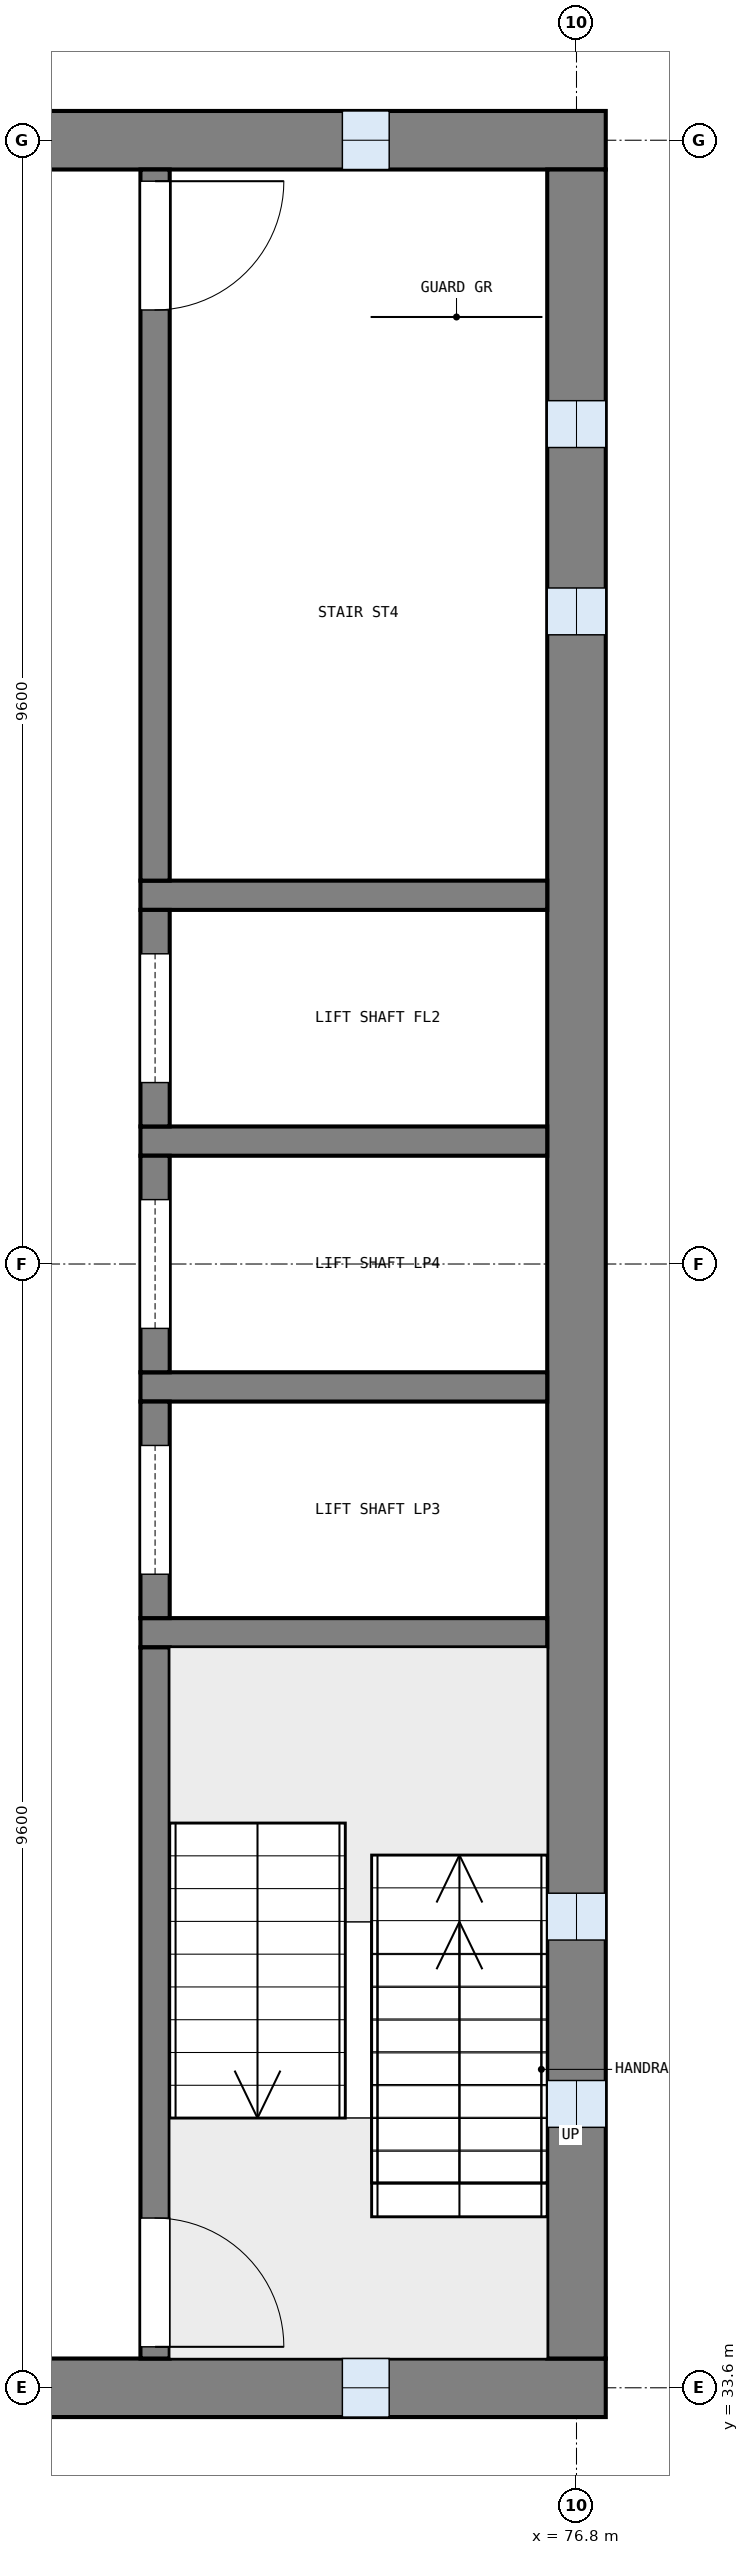
"""IFC4 building model, lengths in metres.
Left out: names, types, materials, properties, quantities, classifications, styles, units other than length and angle.
Written with IfcOpenShell. Run it as: python <this file> out.ifc"""

import sys

from ifc_helpers import new_model, si_unit, direction, frame, frame_2d, origin, place, context, subcontext, project, spatial, rectangle, extrude, element, fill, save


model = new_model("IFC4")
c1 = context("Model", 3, precision=1e-05, world=origin(), true_north=direction((0.0, 1.0)))
c2 = subcontext(c1, "Body", "Model", "MODEL_VIEW")
j1 = project(units=[si_unit("LENGTHUNIT", "METRE"), si_unit("PLANEANGLEUNIT", "RADIAN")], contexts=[c1])
p1 = place(None, origin())
s1 = spatial("IfcSite", under=j1, at=p1, CompositionType="ELEMENT")
p2 = place(p1, origin())
s2 = spatial("IfcBuilding", under=s1, at=p2, CompositionType="ELEMENT")
p3 = place(p2, frame((0.0, 0.0, 64.2)))
s3 = spatial("IfcBuildingStorey", under=s2, at=p3, CompositionType="ELEMENT", Elevation=64.2)
p4 = place(p3, frame((63.75, 52.8, 0.0), z_axis=(0.0, 0.0, 1.0), x_axis=(1.0, 0.0, 0.0)))
e1 = element("IfcWall", 1, at=p4, inside=s3, PredefinedType="SHEAR", context=c2, shape_type="SweptSolid", body=[
    extrude(rectangle(XDim=13.3, YDim=0.5, at=frame_2d((6.65, 0.0))), origin(), (0.0, 0.0, 1.0), 5.1),
])
p5 = place(p4, frame((11.05, 0.0, 1.0)))
e2 = element("IfcOpeningElement", 2, at=p5, cuts=e1, PredefinedType="OPENING", context=c2, shape_type="SweptSolid", body=[
    extrude(rectangle(XDim=0.4, YDim=2.0, at=frame_2d((0.2, 1.0))), frame((0.0, 0.26, 0.0), z_axis=(0.0, -1.0, 0.0), x_axis=(1.0, 0.0, 0.0)), (0.0, 0.0, 1.0), 0.52),
])
p6 = place(p3, frame((63.75, 33.6, 0.0), z_axis=(0.0, 0.0, 1.0), x_axis=(1.0, 0.0, 0.0)))
e3 = element("IfcWall", 3, at=p6, inside=s3, PredefinedType="SHEAR", context=c2, shape_type="SweptSolid", body=[
    extrude(rectangle(XDim=13.3, YDim=0.5, at=frame_2d((6.65, 0.0))), origin(), (0.0, 0.0, 1.0), 5.1),
])
p7 = place(p6, frame((11.05, 0.0, 1.0)))
e4 = element("IfcOpeningElement", 4, at=p7, cuts=e3, PredefinedType="OPENING", context=c2, shape_type="SweptSolid", body=[
    extrude(rectangle(XDim=0.4, YDim=2.0, at=frame_2d((0.2, 1.0))), frame((0.0, 0.26, 0.0), z_axis=(0.0, -1.0, 0.0), x_axis=(1.0, 0.0, 0.0)), (0.0, 0.0, 1.0), 0.52),
])
p8 = place(p3, frame((76.8, 33.85, 0.0), z_axis=(0.0, 0.0, 1.0), x_axis=(0.0, 1.0, 0.0)))
e5 = element("IfcWall", 5, at=p8, inside=s3, PredefinedType="SHEAR", context=c2, shape_type="SweptSolid", body=[
    extrude(rectangle(XDim=18.7, YDim=0.5, at=frame_2d((9.35, 0.0))), origin(), (0.0, 0.0, 1.0), 5.1),
])
p9 = place(p8, frame((1.975, 0.0, 1.0)))
e6 = element("IfcOpeningElement", 6, at=p9, cuts=e5, PredefinedType="OPENING", context=c2, shape_type="SweptSolid", body=[
    extrude(rectangle(XDim=0.4, YDim=2.0, at=frame_2d((0.2, 1.0))), frame((0.0, 0.26, 0.0), z_axis=(0.0, -1.0, 0.0), x_axis=(1.0, 0.0, 0.0)), (0.0, 0.0, 1.0), 0.52),
])
p10 = place(p8, frame((3.575, 0.0, 1.0)))
e7 = element("IfcOpeningElement", 7, at=p10, cuts=e5, PredefinedType="OPENING", context=c2, shape_type="SweptSolid", body=[
    extrude(rectangle(XDim=0.4, YDim=2.0, at=frame_2d((0.2, 1.0))), frame((0.0, 0.26, 0.0), z_axis=(0.0, -1.0, 0.0), x_axis=(1.0, 0.0, 0.0)), (0.0, 0.0, 1.0), 0.52),
])
p11 = place(p8, frame((14.725, 0.0, 1.0)))
e8 = element("IfcOpeningElement", 8, at=p11, cuts=e5, PredefinedType="OPENING", context=c2, shape_type="SweptSolid", body=[
    extrude(rectangle(XDim=0.4, YDim=2.0, at=frame_2d((0.2, 1.0))), frame((0.0, 0.26, 0.0), z_axis=(0.0, -1.0, 0.0), x_axis=(1.0, 0.0, 0.0)), (0.0, 0.0, 1.0), 0.52),
])
p12 = place(p8, frame((16.325, 0.0, 1.0)))
e9 = element("IfcOpeningElement", 9, at=p12, cuts=e5, PredefinedType="OPENING", context=c2, shape_type="SweptSolid", body=[
    extrude(rectangle(XDim=0.4, YDim=2.0, at=frame_2d((0.2, 1.0))), frame((0.0, 0.26, 0.0), z_axis=(0.0, -1.0, 0.0), x_axis=(1.0, 0.0, 0.0)), (0.0, 0.0, 1.0), 0.52),
])
for number, where, z_axis, x_axis in (
    (10, (76.55, 40.05, 0.0), (0.0, 0.0, 1.0), (-1.0, 0.0, 0.0)),
    (11, (76.55, 42.15, 0.0), (0.0, 0.0, 1.0), (-1.0, 0.0, 0.0)),
    (12, (76.55, 44.25, 0.0), (0.0, 0.0, 1.0), (-1.0, 0.0, 0.0)),
    (13, (76.55, 46.35, 0.0), (0.0, 0.0, 1.0), (-1.0, 0.0, 0.0)),
):
    element("IfcWall", number, at=place(p3, frame(where, z_axis=z_axis, x_axis=x_axis)), inside=s3, PredefinedType="SOLIDWALL", context=c2, shape_type="SweptSolid", body=[
        extrude(rectangle(XDim=3.475, YDim=0.25, at=frame_2d((1.738, 0.0))), origin(), (0.0, 0.0, 1.0), 5.1),
    ])
p13 = place(p3, frame((73.2, 33.85, 0.0), z_axis=(0.0, 0.0, 1.0), x_axis=(0.0, 1.0, 0.0)))
e14 = element("IfcWall", 14, at=p13, inside=s3, PredefinedType="SOLIDWALL", context=c2, shape_type="SweptSolid", body=[
    extrude(rectangle(XDim=6.075, YDim=0.25, at=frame_2d((3.038, 0.0))), origin(), (0.0, 0.0, 1.0), 5.1),
])
p14 = place(p13, frame((0.1, 0.0, 0.0)))
e15 = element("IfcOpeningElement", 15, at=p14, cuts=e14, PredefinedType="OPENING", context=c2, shape_type="SweptSolid", body=[
    extrude(rectangle(XDim=1.1, YDim=2.1, at=frame_2d((0.55, 1.05))), frame((0.0, 0.135, 0.0), z_axis=(0.0, -1.0, 0.0), x_axis=(1.0, 0.0, 0.0)), (0.0, 0.0, 1.0), 0.27),
])
p15 = place(p3, frame((73.2, 40.175, 0.0), z_axis=(0.0, 0.0, 1.0), x_axis=(0.0, 1.0, 0.0)))
e16 = element("IfcWall", 16, at=p15, inside=s3, PredefinedType="SOLIDWALL", context=c2, shape_type="SweptSolid", body=[
    extrude(rectangle(XDim=1.85, YDim=0.25, at=frame_2d((0.925, 0.0))), origin(), (0.0, 0.0, 1.0), 5.1),
])
p16 = place(p15, frame((0.375, 0.0, 0.0)))
e17 = element("IfcOpeningElement", 17, at=p16, cuts=e16, PredefinedType="OPENING", context=c2, shape_type="SweptSolid", body=[
    extrude(rectangle(XDim=1.1, YDim=2.1, at=frame_2d((0.55, 1.05))), frame((0.0, 0.135, 0.0), z_axis=(0.0, -1.0, 0.0), x_axis=(1.0, 0.0, 0.0)), (0.0, 0.0, 1.0), 0.27),
])
p17 = place(p3, frame((73.2, 42.275, 0.0), z_axis=(0.0, 0.0, 1.0), x_axis=(0.0, 1.0, 0.0)))
e18 = element("IfcWall", 18, at=p17, inside=s3, PredefinedType="SOLIDWALL", context=c2, shape_type="SweptSolid", body=[
    extrude(rectangle(XDim=1.85, YDim=0.25, at=frame_2d((0.925, 0.0))), origin(), (0.0, 0.0, 1.0), 5.1),
])
p18 = place(p17, frame((0.375, 0.0, 0.0)))
e19 = element("IfcOpeningElement", 19, at=p18, cuts=e18, PredefinedType="OPENING", context=c2, shape_type="SweptSolid", body=[
    extrude(rectangle(XDim=1.1, YDim=2.1, at=frame_2d((0.55, 1.05))), frame((0.0, 0.135, 0.0), z_axis=(0.0, -1.0, 0.0), x_axis=(1.0, 0.0, 0.0)), (0.0, 0.0, 1.0), 0.27),
])
p19 = place(p3, frame((73.2, 44.375, 0.0), z_axis=(0.0, 0.0, 1.0), x_axis=(0.0, 1.0, 0.0)))
e20 = element("IfcWall", 20, at=p19, inside=s3, PredefinedType="SOLIDWALL", context=c2, shape_type="SweptSolid", body=[
    extrude(rectangle(XDim=1.85, YDim=0.25, at=frame_2d((0.925, 0.0))), origin(), (0.0, 0.0, 1.0), 5.1),
])
p20 = place(p19, frame((0.375, 0.0, 0.0)))
e21 = element("IfcOpeningElement", 21, at=p20, cuts=e20, PredefinedType="OPENING", context=c2, shape_type="SweptSolid", body=[
    extrude(rectangle(XDim=1.1, YDim=2.1, at=frame_2d((0.55, 1.05))), frame((0.0, 0.135, 0.0), z_axis=(0.0, -1.0, 0.0), x_axis=(1.0, 0.0, 0.0)), (0.0, 0.0, 1.0), 0.27),
])
p21 = place(p3, frame((73.2, 46.475, 0.0), z_axis=(0.0, 0.0, 1.0), x_axis=(0.0, 1.0, 0.0)))
e22 = element("IfcWall", 22, at=p21, inside=s3, PredefinedType="SOLIDWALL", context=c2, shape_type="SweptSolid", body=[
    extrude(rectangle(XDim=6.075, YDim=0.25, at=frame_2d((3.038, 0.0))), origin(), (0.0, 0.0, 1.0), 5.1),
])
p22 = place(p21, frame((4.875, 0.0, 0.0)))
e23 = element("IfcOpeningElement", 23, at=p22, cuts=e22, PredefinedType="OPENING", context=c2, shape_type="SweptSolid", body=[
    extrude(rectangle(XDim=1.1, YDim=2.1, at=frame_2d((0.55, 1.05))), frame((0.0, 0.135, 0.0), z_axis=(0.0, -1.0, 0.0), x_axis=(1.0, 0.0, 0.0)), (0.0, 0.0, 1.0), 0.27),
])
p23 = place(p9, origin())
e24 = element("IfcWindow", 24, at=p23, inside=s3, PartitioningType="SINGLE_PANEL", PredefinedType="WINDOW", context=c2, shape_type="SweptSolid", body=[
    extrude(rectangle(XDim=0.4, YDim=2.0, at=frame_2d((0.2, 1.0))), frame((0.0, 0.03, 0.0), z_axis=(0.0, -1.0, 0.0), x_axis=(1.0, 0.0, 0.0)), (0.0, 0.0, 1.0), 0.06),
])
fill(e6, e24)
p24 = place(p10, origin())
e25 = element("IfcWindow", 25, at=p24, inside=s3, PartitioningType="SINGLE_PANEL", PredefinedType="WINDOW", context=c2, shape_type="SweptSolid", body=[
    extrude(rectangle(XDim=0.4, YDim=2.0, at=frame_2d((0.2, 1.0))), frame((0.0, 0.03, 0.0), z_axis=(0.0, -1.0, 0.0), x_axis=(1.0, 0.0, 0.0)), (0.0, 0.0, 1.0), 0.06),
])
fill(e7, e25)
p25 = place(p11, origin())
e26 = element("IfcWindow", 26, at=p25, inside=s3, PartitioningType="SINGLE_PANEL", PredefinedType="WINDOW", context=c2, shape_type="SweptSolid", body=[
    extrude(rectangle(XDim=0.4, YDim=2.0, at=frame_2d((0.2, 1.0))), frame((0.0, 0.03, 0.0), z_axis=(0.0, -1.0, 0.0), x_axis=(1.0, 0.0, 0.0)), (0.0, 0.0, 1.0), 0.06),
])
fill(e8, e26)
p26 = place(p12, origin())
e27 = element("IfcWindow", 27, at=p26, inside=s3, PartitioningType="SINGLE_PANEL", PredefinedType="WINDOW", context=c2, shape_type="SweptSolid", body=[
    extrude(rectangle(XDim=0.4, YDim=2.0, at=frame_2d((0.2, 1.0))), frame((0.0, 0.03, 0.0), z_axis=(0.0, -1.0, 0.0), x_axis=(1.0, 0.0, 0.0)), (0.0, 0.0, 1.0), 0.06),
])
fill(e9, e27)
p27 = place(p7, origin())
e28 = element("IfcWindow", 28, at=p27, inside=s3, PartitioningType="SINGLE_PANEL", PredefinedType="WINDOW", context=c2, shape_type="SweptSolid", body=[
    extrude(rectangle(XDim=0.4, YDim=2.0, at=frame_2d((0.2, 1.0))), frame((0.0, 0.03, 0.0), z_axis=(0.0, -1.0, 0.0), x_axis=(1.0, 0.0, 0.0)), (0.0, 0.0, 1.0), 0.06),
])
fill(e4, e28)
p28 = place(p5, origin())
e29 = element("IfcWindow", 29, at=p28, inside=s3, PartitioningType="SINGLE_PANEL", PredefinedType="WINDOW", context=c2, shape_type="SweptSolid", body=[
    extrude(rectangle(XDim=0.4, YDim=2.0, at=frame_2d((0.2, 1.0))), frame((0.0, 0.03, 0.0), z_axis=(0.0, -1.0, 0.0), x_axis=(1.0, 0.0, 0.0)), (0.0, 0.0, 1.0), 0.06),
])
fill(e2, e29)
p29 = place(p2, frame((0.0, 0.0, 69.3)))
p30 = place(p29, frame((73.2, 33.85, 0.3), z_axis=(0.0, 0.0, 1.0), x_axis=(0.0, 1.0, 0.0)))
p31 = place(p30, frame((4.712, 0.0, 0.13)))
p32 = place(p31, origin())
e30 = element("IfcDoor", 30, at=p32, inside=s3, OperationType="SINGLE_SWING_LEFT", PredefinedType="DOOR", context=c2, shape_type="SweptSolid", body=[
    extrude(rectangle(XDim=1.1, YDim=2.1, at=frame_2d((0.55, 1.05))), frame((0.0, 0.025, 0.0), z_axis=(0.0, -1.0, 0.0), x_axis=(1.0, 0.0, 0.0)), (0.0, 0.0, 1.0), 0.05),
])
p33 = place(p14, frame((1.1, 0.0, 0.0), z_axis=(0.0, 0.0, 1.0), x_axis=(-1.0, 0.0, 0.0)))
e31 = element("IfcDoor", 31, at=p33, inside=s3, OperationType="SINGLE_SWING_RIGHT", PredefinedType="DOOR", context=c2, shape_type="SweptSolid", body=[
    extrude(rectangle(XDim=1.1, YDim=2.1, at=frame_2d((0.55, 1.05))), frame((0.0, 0.025, 0.0), z_axis=(0.0, -1.0, 0.0), x_axis=(1.0, 0.0, 0.0)), (0.0, 0.0, 1.0), 0.05),
])
fill(e15, e31)
p34 = place(p22, frame((1.1, 0.0, 0.0), z_axis=(0.0, 0.0, 1.0), x_axis=(-1.0, 0.0, 0.0)))
e32 = element("IfcDoor", 32, at=p34, inside=s3, OperationType="SINGLE_SWING_LEFT", PredefinedType="DOOR", context=c2, shape_type="SweptSolid", body=[
    extrude(rectangle(XDim=1.1, YDim=2.1, at=frame_2d((0.55, 1.05))), frame((0.0, 0.025, 0.0), z_axis=(0.0, -1.0, 0.0), x_axis=(1.0, 0.0, 0.0)), (0.0, 0.0, 1.0), 0.05),
])
fill(e23, e32)
p35 = place(p16, origin())
e33 = element("IfcDoor", 33, at=p35, inside=s3, OperationType="SLIDING_TO_LEFT", PredefinedType="DOOR", context=c2, shape_type="SweptSolid", body=[
    extrude(rectangle(XDim=1.1, YDim=2.1, at=frame_2d((0.55, 1.05))), frame((0.0, 0.025, 0.0), z_axis=(0.0, -1.0, 0.0), x_axis=(1.0, 0.0, 0.0)), (0.0, 0.0, 1.0), 0.05),
])
fill(e17, e33)
p36 = place(p18, origin())
e34 = element("IfcDoor", 34, at=p36, inside=s3, OperationType="SLIDING_TO_LEFT", PredefinedType="DOOR", context=c2, shape_type="SweptSolid", body=[
    extrude(rectangle(XDim=1.1, YDim=2.1, at=frame_2d((0.55, 1.05))), frame((0.0, 0.025, 0.0), z_axis=(0.0, -1.0, 0.0), x_axis=(1.0, 0.0, 0.0)), (0.0, 0.0, 1.0), 0.05),
])
fill(e19, e34)
p37 = place(p20, origin())
e35 = element("IfcDoor", 35, at=p37, inside=s3, OperationType="SLIDING_TO_LEFT", PredefinedType="DOOR", context=c2, shape_type="SweptSolid", body=[
    extrude(rectangle(XDim=1.1, YDim=2.1, at=frame_2d((0.55, 1.05))), frame((0.0, 0.025, 0.0), z_axis=(0.0, -1.0, 0.0), x_axis=(1.0, 0.0, 0.0)), (0.0, 0.0, 1.0), 0.05),
])
fill(e21, e35)
save(model, sys.argv[1])
